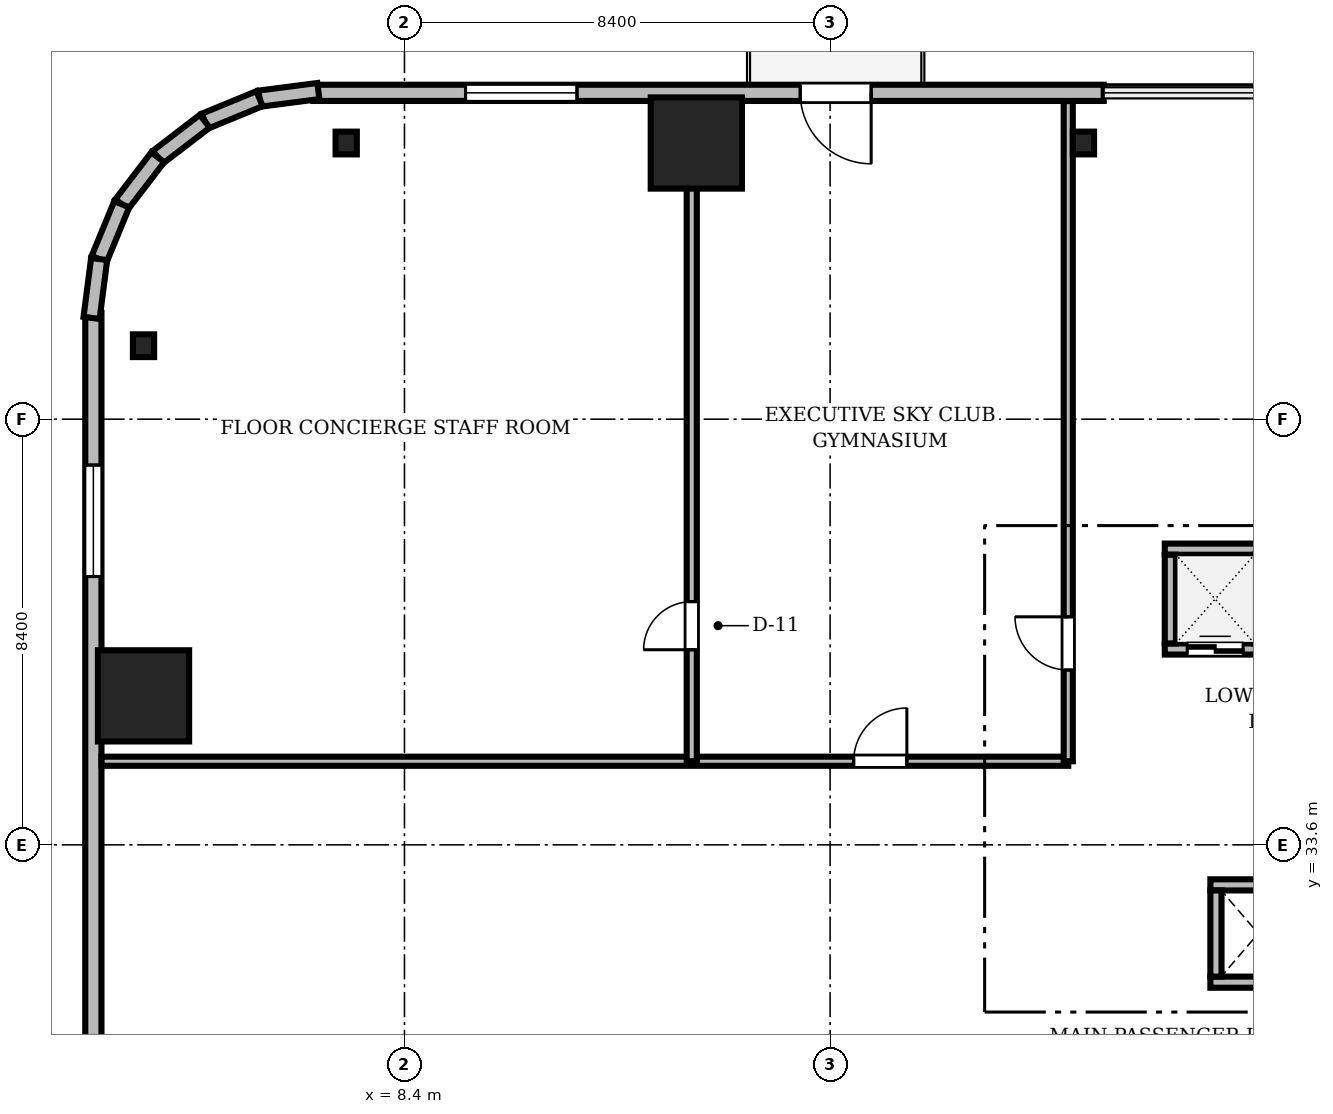
"""IFC4 building model, lengths in metres.
Left out: names, types, materials, properties, quantities, classifications, styles, units other than length and angle.
Written with IfcOpenShell. Run it as: python <this file> out.ifc"""

import sys

from ifc_helpers import new_model, si_unit, direction, frame, frame_2d, origin, origin_2d, place, context, subcontext, project, spatial, rectangle, i_section, extrude, source, transform, mapped, element, fill, save


model = new_model("IFC4")
c1 = context("Model", 3, precision=1e-05, world=origin(), true_north=direction((0.0, 1.0)))
c2 = subcontext(c1, "Body", "Model", "MODEL_VIEW")
j1 = project(units=[si_unit("LENGTHUNIT", "METRE"), si_unit("PLANEANGLEUNIT", "RADIAN")], contexts=[c1])
p1 = place(None, origin())
s1 = spatial("IfcSite", under=j1, at=p1, CompositionType="ELEMENT")
p2 = place(p1, origin())
s2 = spatial("IfcBuilding", under=s1, at=p2, CompositionType="ELEMENT")
p3 = place(p2, frame((0.0, 0.0, 53.15)))
s3 = spatial("IfcBuildingStorey", under=s2, at=p3, CompositionType="ELEMENT", Elevation=53.15)
m1 = source(origin(), c2, "Body", "SweptSolid", [
    extrude(rectangle(XDim=1.8, YDim=1.8, at=origin_2d()), origin(), (0.0, 0.0, 1.0), 3.41),
])
for number, where, z_axis, x_axis in (
    (1, (14.16, 47.45, 0.0), (0.0, 0.0, 1.0), (1.0, 0.0, 0.0)),
    (2, (3.25, 36.54, 0.0), (0.0, 0.0, 1.0), (1.0, 0.0, 0.0)),
):
    element("IfcColumn", number, at=place(p3, frame(where, z_axis=z_axis, x_axis=x_axis)), inside=s3, PredefinedType="COLUMN", context=c2, shape_type="MappedRepresentation", body=[
        mapped(m1, transform((0.0, 0.0, 0.0), scale=1.0)),
    ])
m2 = source(origin(), c2, "Body", "SweptSolid", [
    extrude(i_section(OverallWidth=0.419, OverallDepth=0.449, WebThickness=0.031, FlangeThickness=0.048, FilletRadius=0.015, at=origin_2d()), origin(), (0.0, 0.0, 1.0), 3.41),
])
for number, where, z_axis, x_axis in (
    (3, (21.8, 47.45, 0.0), (0.0, 0.0, 1.0), (1.0, 0.0, 0.0)),
    (4, (7.25, 47.45, 0.0), (0.0, 0.0, 1.0), (1.0, 0.0, 0.0)),
    (5, (3.25, 43.45, 0.0), (0.0, 0.0, 1.0), (1.0, 0.0, 0.0)),
):
    element("IfcColumn", number, at=place(p3, frame(where, z_axis=z_axis, x_axis=x_axis)), inside=s3, PredefinedType="COLUMN", context=c2, shape_type="MappedRepresentation", body=[
        mapped(m2, transform((0.0, 0.0, 0.0), scale=1.0)),
    ])
m3 = source(origin(), c2, "Body", "SweptSolid", [
    extrude(rectangle(XDim=15.6, YDim=0.32, at=frame_2d((7.8, 0.0))), origin(), (0.0, 0.0, 1.0), 3.41),
])
p4 = place(p3, frame((22.2, 48.44, 0.0), z_axis=(0.0, 0.0, 1.0), x_axis=(-1.0, 0.0, 0.0)))
e6 = element("IfcWall", 6, at=p4, inside=s3, PredefinedType="SOLIDWALL", context=c2, shape_type="MappedRepresentation", body=[
    mapped(m3, transform((0.0, 0.0, 0.0), scale=1.0)),
])
m4 = source(origin(), c2, "Body", "SweptSolid", [
    extrude(rectangle(XDim=1.4, YDim=2.3, at=frame_2d((0.7, 1.15))), frame((0.0, 0.17, 0.0), z_axis=(0.0, -1.0, 0.0), x_axis=(1.0, 0.0, 0.0)), (0.0, 0.0, 1.0), 0.34),
])
p5 = place(p4, frame((4.59, 0.0, 0.0)))
e7 = element("IfcOpeningElement", 7, at=p5, cuts=e6, PredefinedType="OPENING", context=c2, shape_type="MappedRepresentation", body=[
    mapped(m4, transform((0.0, 0.0, 0.0), scale=1.0)),
])
m5 = source(origin(), c2, "Body", "SweptSolid", [
    extrude(rectangle(XDim=2.2, YDim=2.4, at=frame_2d((1.1, 1.2))), frame((0.0, 0.17, 0.0), z_axis=(0.0, -1.0, 0.0), x_axis=(1.0, 0.0, 0.0)), (0.0, 0.0, 1.0), 0.34),
])
p6 = place(p4, frame((10.395, 0.0, 0.72)))
e8 = element("IfcOpeningElement", 8, at=p6, cuts=e6, PredefinedType="OPENING", context=c2, shape_type="MappedRepresentation", body=[
    mapped(m5, transform((0.0, 0.0, 0.0), scale=1.0)),
])
m6 = source(origin(), c2, "Body", "SweptSolid", [
    extrude(rectangle(XDim=15.6, YDim=0.32, at=frame_2d((7.8, 0.0))), origin(), (0.0, 0.0, 1.0), 3.41),
])
p7 = place(p3, frame((2.26, 44.1, 0.0), z_axis=(0.0, 0.0, 1.0), x_axis=(0.0, -1.0, 0.0)))
e9 = element("IfcWall", 9, at=p7, inside=s3, PredefinedType="SOLIDWALL", context=c2, shape_type="MappedRepresentation", body=[
    mapped(m6, transform((0.0, 0.0, 0.0), scale=1.0)),
])
p8 = place(p7, frame((3.005, 0.0, 0.72)))
e10 = element("IfcOpeningElement", 10, at=p8, cuts=e9, PredefinedType="OPENING", context=c2, shape_type="MappedRepresentation", body=[
    mapped(m5, transform((0.0, 0.0, 0.0), scale=1.0)),
])
m7 = source(origin(), c2, "Body", "SweptSolid", [
    extrude(rectangle(XDim=1.17, YDim=0.32, at=frame_2d((0.585, 0.0))), origin(), (0.0, 0.0, 1.0), 3.41),
])
p9 = place(p3, frame((6.7, 48.476, 0.0), z_axis=(0.0, 0.0, 1.0), x_axis=(-0.991735963317, -0.128295670475, 0.0)))
e11 = element("IfcWall", 11, at=p9, inside=s3, PredefinedType="SOLIDWALL", context=c2, shape_type="MappedRepresentation", body=[
    mapped(m7, transform((0.0, 0.0, 0.0), scale=1.0)),
])
m8 = source(origin(), c2, "Body", "SweptSolid", [
    extrude(rectangle(XDim=1.169, YDim=0.32, at=frame_2d((0.584, 0.0))), origin(), (0.0, 0.0, 1.0), 3.41),
])
p10 = place(p3, frame((5.54, 48.325, 0.0), z_axis=(0.0, 0.0, 1.0), x_axis=(-0.924552646638, -0.381054331552, 0.0)))
e12 = element("IfcWall", 12, at=p10, inside=s3, PredefinedType="SOLIDWALL", context=c2, shape_type="MappedRepresentation", body=[
    mapped(m8, transform((0.0, 0.0, 0.0), scale=1.0)),
])
m9 = source(origin(), c2, "Body", "SweptSolid", [
    extrude(rectangle(XDim=1.169, YDim=0.32, at=frame_2d((0.584, 0.0))), origin(), (0.0, 0.0, 1.0), 3.41),
])
p11 = place(p3, frame((4.459, 47.88, 0.0), z_axis=(0.0, 0.0, 1.0), x_axis=(-0.793663520347, -0.608356981114, 0.0)))
e13 = element("IfcWall", 13, at=p11, inside=s3, PredefinedType="SOLIDWALL", context=c2, shape_type="MappedRepresentation", body=[
    mapped(m9, transform((0.0, 0.0, 0.0), scale=1.0)),
])
m10 = source(origin(), c2, "Body", "SweptSolid", [
    extrude(rectangle(XDim=1.169, YDim=0.32, at=frame_2d((0.584, 0.0))), origin(), (0.0, 0.0, 1.0), 3.41),
])
p12 = place(p3, frame((3.531, 47.169, 0.0), z_axis=(0.0, 0.0, 1.0), x_axis=(-0.608387696831, -0.793639975269, 0.0)))
e14 = element("IfcWall", 14, at=p12, inside=s3, PredefinedType="SOLIDWALL", context=c2, shape_type="MappedRepresentation", body=[
    mapped(m10, transform((0.0, 0.0, 0.0), scale=1.0)),
])
p13 = place(p3, frame((2.82, 46.241, 0.0), z_axis=(0.0, 0.0, 1.0), x_axis=(-0.381054331552, -0.924552646638, 0.0)))
e15 = element("IfcWall", 15, at=p13, inside=s3, PredefinedType="SOLIDWALL", context=c2, shape_type="MappedRepresentation", body=[
    mapped(m8, transform((0.0, 0.0, 0.0), scale=1.0)),
])
p14 = place(p3, frame((2.375, 45.16, 0.0), z_axis=(0.0, 0.0, 1.0), x_axis=(-0.128295670475, -0.991735963317, 0.0)))
e16 = element("IfcWall", 16, at=p14, inside=s3, PredefinedType="SOLIDWALL", context=c2, shape_type="MappedRepresentation", body=[
    mapped(m7, transform((0.0, 0.0, 0.0), scale=1.0)),
])
m11 = source(origin(), c2, "Body", "SweptSolid", [
    extrude(rectangle(XDim=1.99, YDim=0.22, at=frame_2d((0.995, 0.0))), origin(), (0.0, 0.0, 1.0), 3.41),
])
p15 = place(p3, frame((23.405, 37.465, 0.0), z_axis=(0.0, 0.0, 1.0), x_axis=(1.0, 0.0, 0.0)))
e17 = element("IfcWall", 17, at=p15, inside=s3, PredefinedType="SOLIDWALL", context=c2, shape_type="MappedRepresentation", body=[
    mapped(m11, transform((0.0, 0.0, 0.0), scale=1.0)),
])
m12 = source(origin(), c2, "Body", "SweptSolid", [
    extrude(rectangle(XDim=1.1, YDim=2.2, at=frame_2d((0.55, 1.1))), frame((0.0, 0.12, 0.0), z_axis=(0.0, -1.0, 0.0), x_axis=(1.0, 0.0, 0.0)), (0.0, 0.0, 1.0), 0.24),
])
p16 = place(p15, frame((0.445, 0.0, 0.0)))
e18 = element("IfcOpeningElement", 18, at=p16, cuts=e17, PredefinedType="OPENING", context=c2, shape_type="MappedRepresentation", body=[
    mapped(m12, transform((0.0, 0.0, 0.0), scale=1.0)),
])
p17 = place(p3, frame((23.405, 39.435, 0.0), z_axis=(0.0, 0.0, 1.0), x_axis=(1.0, 0.0, 0.0)))
e19 = element("IfcWall", 19, at=p17, inside=s3, PredefinedType="SOLIDWALL", context=c2, shape_type="MappedRepresentation", body=[
    mapped(m11, transform((0.0, 0.0, 0.0), scale=1.0)),
])
m13 = source(origin(), c2, "Body", "SweptSolid", [
    extrude(rectangle(XDim=1.75, YDim=0.22, at=frame_2d((0.875, 0.0))), origin(), (0.0, 0.0, 1.0), 3.41),
])
p18 = place(p3, frame((23.515, 37.575, 0.0), z_axis=(0.0, 0.0, 1.0), x_axis=(0.0, 1.0, 0.0)))
e20 = element("IfcWall", 20, at=p18, inside=s3, PredefinedType="SOLIDWALL", context=c2, shape_type="MappedRepresentation", body=[
    mapped(m13, transform((0.0, 0.0, 0.0), scale=1.0)),
])
m14 = source(origin(), c2, "Body", "SweptSolid", [
    extrude(rectangle(XDim=1.89, YDim=0.22, at=frame_2d((0.945, 0.0))), origin(), (0.0, 0.0, 1.0), 3.41),
])
for number, where, z_axis, x_axis in (
    (21, (24.305, 30.89, 0.0), (0.0, 0.0, 1.0), (1.0, 0.0, 0.0)),
    (22, (24.305, 32.81, 0.0), (0.0, 0.0, 1.0), (1.0, 0.0, 0.0)),
):
    element("IfcWall", number, at=place(p3, frame(where, z_axis=z_axis, x_axis=x_axis)), inside=s3, PredefinedType="SOLIDWALL", context=c2, shape_type="MappedRepresentation", body=[
        mapped(m14, transform((0.0, 0.0, 0.0), scale=1.0)),
    ])
m15 = source(origin(), c2, "Body", "SweptSolid", [
    extrude(rectangle(XDim=1.7, YDim=0.22, at=frame_2d((0.85, 0.0))), origin(), (0.0, 0.0, 1.0), 3.41),
])
p19 = place(p3, frame((24.415, 31.0, 0.0), z_axis=(0.0, 0.0, 1.0), x_axis=(0.0, 1.0, 0.0)))
e23 = element("IfcWall", 23, at=p19, inside=s3, PredefinedType="SOLIDWALL", context=c2, shape_type="MappedRepresentation", body=[
    mapped(m15, transform((0.0, 0.0, 0.0), scale=1.0)),
])
m16 = source(origin(), c2, "Body", "SweptSolid", [
    extrude(rectangle(XDim=19.078, YDim=0.18, at=frame_2d((9.539, 0.0))), origin(), (0.0, 0.0, 1.0), 2.652),
])
p20 = place(p3, frame((2.422, 35.25, 0.0), z_axis=(0.0, 0.0, 1.0), x_axis=(1.0, 0.0, 0.0)))
e24 = element("IfcWall", 24, at=p20, inside=s3, PredefinedType="PARTITIONING", context=c2, shape_type="MappedRepresentation", body=[
    mapped(m16, transform((0.0, 0.0, 0.0), scale=1.0)),
])
m17 = source(origin(), c2, "Body", "SweptSolid", [
    extrude(rectangle(XDim=1.05, YDim=2.2, at=frame_2d((0.525, 1.1))), frame((0.0, 0.1, 0.0), z_axis=(0.0, -1.0, 0.0), x_axis=(1.0, 0.0, 0.0)), (0.0, 0.0, 1.0), 0.2),
])
p21 = place(p20, frame((14.843, 0.0, 0.0)))
e25 = element("IfcOpeningElement", 25, at=p21, cuts=e24, PredefinedType="OPENING", context=c2, shape_type="MappedRepresentation", body=[
    mapped(m17, transform((0.0, 0.0, 0.0), scale=1.0)),
])
m18 = source(origin(), c2, "Body", "SweptSolid", [
    extrude(rectangle(XDim=13.028, YDim=0.2, at=frame_2d((6.514, 0.0))), origin(), (0.0, 0.0, 1.0), 2.652),
])
p22 = place(p3, frame((14.07, 35.25, 0.0), z_axis=(0.0, 0.0, 1.0), x_axis=(0.0, 1.0, 0.0)))
e26 = element("IfcWall", 26, at=p22, inside=s3, PredefinedType="PARTITIONING", context=c2, shape_type="MappedRepresentation", body=[
    mapped(m18, transform((0.0, 0.0, 0.0), scale=1.0)),
])
m19 = source(origin(), c2, "Body", "SweptSolid", [
    extrude(rectangle(XDim=0.95, YDim=2.15, at=frame_2d((0.475, 1.075))), frame((0.0, 0.11, 0.0), z_axis=(0.0, -1.0, 0.0), x_axis=(1.0, 0.0, 0.0)), (0.0, 0.0, 1.0), 0.22),
])
p23 = place(p22, frame((2.2, 0.0, 0.0)))
e27 = element("IfcOpeningElement", 27, at=p23, cuts=e26, PredefinedType="OPENING", context=c2, shape_type="MappedRepresentation", body=[
    mapped(m19, transform((0.0, 0.0, 0.0), scale=1.0)),
])
m20 = source(origin(), c2, "Body", "SweptSolid", [
    extrude(rectangle(XDim=13.028, YDim=0.18, at=frame_2d((6.514, 0.0))), origin(), (0.0, 0.0, 1.0), 2.652),
])
p24 = place(p3, frame((21.5, 35.25, 0.0), z_axis=(0.0, 0.0, 1.0), x_axis=(0.0, 1.0, 0.0)))
e28 = element("IfcWall", 28, at=p24, inside=s3, PredefinedType="PARTITIONING", context=c2, shape_type="MappedRepresentation", body=[
    mapped(m20, transform((0.0, 0.0, 0.0), scale=1.0)),
])
p25 = place(p24, frame((1.8, 0.0, 0.0)))
e29 = element("IfcOpeningElement", 29, at=p25, cuts=e28, PredefinedType="OPENING", context=c2, shape_type="MappedRepresentation", body=[
    mapped(m17, transform((0.0, 0.0, 0.0), scale=1.0)),
])
m21 = source(origin(), c2, "Body", "SweptSolid", [
    extrude(rectangle(XDim=1.4, YDim=2.3, at=frame_2d((0.7, 1.15))), frame((0.0, 0.025, 0.0), z_axis=(0.0, -1.0, 0.0), x_axis=(1.0, 0.0, 0.0)), (0.0, 0.0, 1.0), 0.05),
])
p26 = place(p5, frame((1.4, 0.0, 0.0), z_axis=(0.0, 0.0, 1.0), x_axis=(-1.0, 0.0, 0.0)))
e30 = element("IfcDoor", 30, at=p26, inside=s3, OperationType="DOUBLE_DOOR_SLIDING", PredefinedType="DOOR", context=c2, shape_type="MappedRepresentation", body=[
    mapped(m21, transform((0.0, 0.0, 0.0), scale=1.0)),
])
fill(e7, e30)
m22 = source(origin(), c2, "Body", "SweptSolid", [
    extrude(rectangle(XDim=2.2, YDim=2.4, at=frame_2d((1.1, 1.2))), frame((0.0, 0.03, 0.0), z_axis=(0.0, -1.0, 0.0), x_axis=(1.0, 0.0, 0.0)), (0.0, 0.0, 1.0), 0.06),
])
p27 = place(p6, origin())
e31 = element("IfcWindow", 31, at=p27, inside=s3, PartitioningType="SINGLE_PANEL", PredefinedType="WINDOW", context=c2, shape_type="MappedRepresentation", body=[
    mapped(m22, transform((0.0, 0.0, 0.0), scale=1.0)),
])
fill(e8, e31)
p28 = place(p8, origin())
e32 = element("IfcWindow", 32, at=p28, inside=s3, PartitioningType="SINGLE_PANEL", PredefinedType="WINDOW", context=c2, shape_type="MappedRepresentation", body=[
    mapped(m22, transform((0.0, 0.0, 0.0), scale=1.0)),
])
fill(e10, e32)
m23 = source(origin(), c2, "Body", "SweptSolid", [
    extrude(rectangle(XDim=1.1, YDim=2.2, at=frame_2d((0.55, 1.1))), frame((0.0, 0.025, 0.0), z_axis=(0.0, -1.0, 0.0), x_axis=(1.0, 0.0, 0.0)), (0.0, 0.0, 1.0), 0.05),
])
p29 = place(p16, origin())
e33 = element("IfcDoor", 33, at=p29, inside=s3, OperationType="DOUBLE_DOOR_SLIDING", PredefinedType="DOOR", context=c2, shape_type="MappedRepresentation", body=[
    mapped(m23, transform((0.0, 0.0, 0.0), scale=1.0)),
])
fill(e18, e33)
m24 = source(origin(), c2, "Body", "SweptSolid", [
    extrude(rectangle(XDim=1.05, YDim=2.2, at=frame_2d((0.525, 1.1))), frame((0.0, 0.025, 0.0), z_axis=(0.0, -1.0, 0.0), x_axis=(1.0, 0.0, 0.0)), (0.0, 0.0, 1.0), 0.05),
])
p30 = place(p21, origin())
e34 = element("IfcDoor", 34, at=p30, inside=s3, OperationType="SINGLE_SWING_RIGHT", PredefinedType="DOOR", context=c2, shape_type="MappedRepresentation", body=[
    mapped(m24, transform((0.0, 0.0, 0.0), scale=1.0)),
])
fill(e25, e34)
m25 = source(origin(), c2, "Body", "SweptSolid", [
    extrude(rectangle(XDim=0.95, YDim=2.15, at=frame_2d((0.475, 1.075))), frame((0.0, 0.025, 0.0), z_axis=(0.0, -1.0, 0.0), x_axis=(1.0, 0.0, 0.0)), (0.0, 0.0, 1.0), 0.05),
])
p31 = place(p23, origin())
e35 = element("IfcDoor", 35, at=p31, inside=s3, OperationType="SINGLE_SWING_LEFT", PredefinedType="DOOR", context=c2, shape_type="MappedRepresentation", body=[
    mapped(m25, transform((0.0, 0.0, 0.0), scale=1.0)),
])
fill(e27, e35)
p32 = place(p25, origin())
e36 = element("IfcDoor", 36, at=p32, inside=s3, OperationType="SINGLE_SWING_RIGHT", PredefinedType="DOOR", context=c2, shape_type="MappedRepresentation", body=[
    mapped(m24, transform((0.0, 0.0, 0.0), scale=1.0)),
])
fill(e29, e36)
save(model, sys.argv[1])
